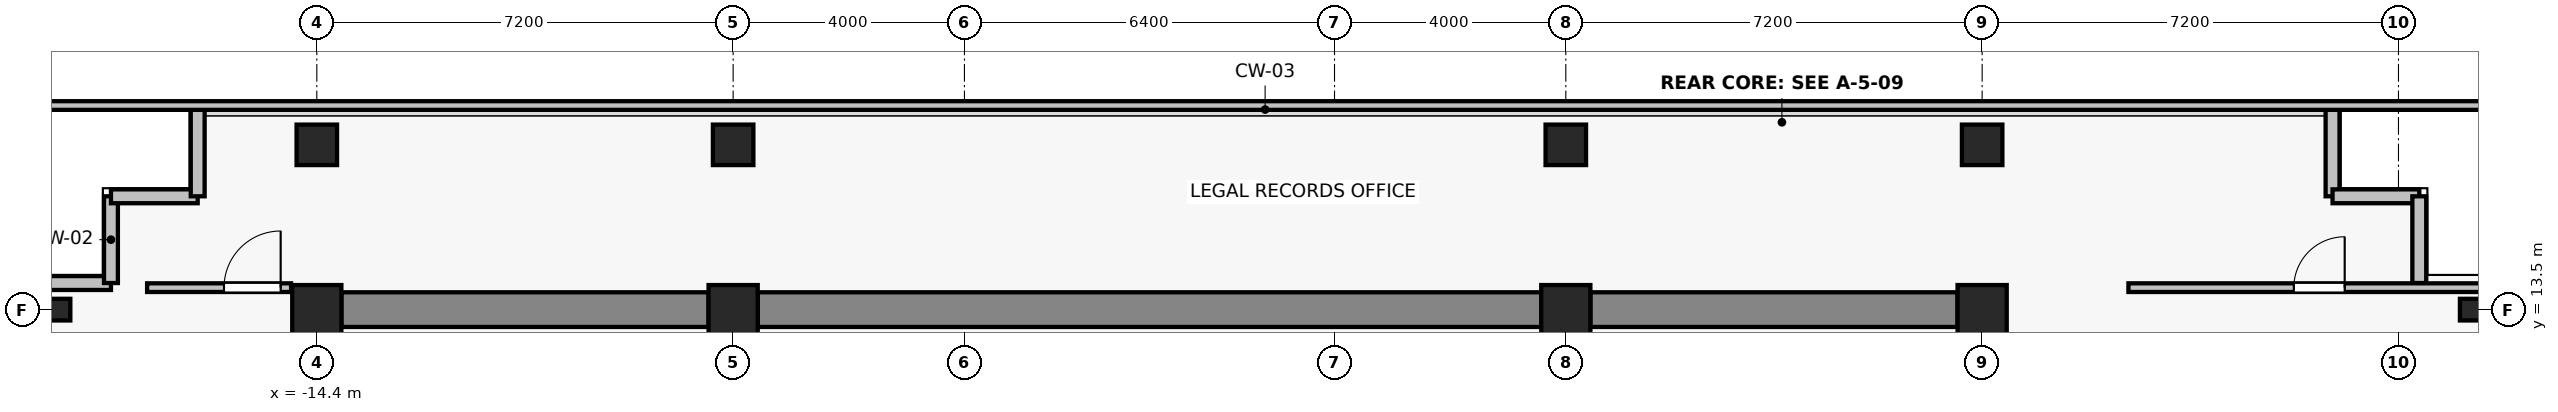
"""IFC4 building model, lengths in metres.
Left out: names, types, materials, properties, quantities, classifications, styles, units other than length and angle.
Written with IfcOpenShell. Run it as: python <this file> out.ifc"""

import sys

from ifc_helpers import new_model, si_unit, direction, frame, frame_2d, origin, origin_2d, place, context, subcontext, project, spatial, rectangle, i_section, extrude, source, transform, mapped, element, fill, save


model = new_model("IFC4")
c1 = context("Model", 3, precision=1e-05, world=origin(), true_north=direction((0.0, 1.0)))
c2 = subcontext(c1, "Body", "Model", "MODEL_VIEW")
j1 = project(units=[si_unit("LENGTHUNIT", "METRE"), si_unit("PLANEANGLEUNIT", "RADIAN")], contexts=[c1])
p1 = place(None, origin())
s1 = spatial("IfcSite", under=j1, at=p1, CompositionType="ELEMENT")
p2 = place(p1, origin())
s2 = spatial("IfcBuilding", under=s1, at=p2, CompositionType="ELEMENT")
p3 = place(p2, frame((0.0, 0.0, 255.1)))
s3 = spatial("IfcBuildingStorey", under=s2, at=p3, CompositionType="ELEMENT", Elevation=255.1)
for number, where, z_axis, x_axis in (
    (1, (-14.4, 13.5, 0.0), (0.0, 0.0, 1.0), (1.0, 0.0, 0.0)),
    (2, (-7.2, 13.5, 0.0), (0.0, 0.0, 1.0), (1.0, 0.0, 0.0)),
    (3, (7.2, 13.5, 0.0), (0.0, 0.0, 1.0), (1.0, 0.0, 0.0)),
    (4, (14.4, 13.5, 0.0), (0.0, 0.0, 1.0), (1.0, 0.0, 0.0)),
):
    element("IfcColumn", number, at=place(p3, frame(where, z_axis=z_axis, x_axis=x_axis)), inside=s3, PredefinedType="COLUMN", context=c2, shape_type="SweptSolid", body=[
        extrude(rectangle(XDim=0.85, YDim=0.85, at=origin_2d()), origin(), (0.0, 0.0, 1.0), 3.3),
    ])
for number, where, z_axis, x_axis in (
    (5, (-14.4, 16.35, 0.0), (0.0, 0.0, 1.0), (1.0, 0.0, 0.0)),
    (6, (-7.2, 16.35, 0.0), (0.0, 0.0, 1.0), (1.0, 0.0, 0.0)),
    (7, (7.2, 16.35, 0.0), (0.0, 0.0, 1.0), (1.0, 0.0, 0.0)),
    (8, (14.4, 16.35, 0.0), (0.0, 0.0, 1.0), (1.0, 0.0, 0.0)),
):
    element("IfcColumn", number, at=place(p3, frame(where, z_axis=z_axis, x_axis=x_axis)), inside=s3, PredefinedType="COLUMN", context=c2, shape_type="SweptSolid", body=[
        extrude(rectangle(XDim=0.7, YDim=0.7, at=origin_2d()), origin(), (0.0, 0.0, 1.0), 3.3),
    ])
for number, where, z_axis, x_axis in (
    (9, (-18.85, 13.5, 0.0), (0.0, 0.0, 1.0), (1.0, 0.0, 0.0)),
    (10, (22.85, 13.5, 0.0), (0.0, 0.0, 1.0), (1.0, 0.0, 0.0)),
):
    element("IfcColumn", number, at=place(p3, frame(where, z_axis=z_axis, x_axis=x_axis)), inside=s3, PredefinedType="COLUMN", context=c2, shape_type="SweptSolid", body=[
        extrude(i_section(OverallWidth=0.375, OverallDepth=0.375, WebThickness=0.017, FlangeThickness=0.027, FilletRadius=0.015, at=origin_2d()), origin(), (0.0, 0.0, 1.0), 3.3),
    ])
p4 = place(p3, frame((-13.975, 13.5, 0.0), z_axis=(0.0, 0.0, 1.0), x_axis=(1.0, 0.0, 0.0)))
e11 = element("IfcWall", 11, at=p4, inside=s3, PredefinedType="SHEAR", context=c2, shape_type="SweptSolid", body=[
    extrude(rectangle(XDim=6.35, YDim=0.6, at=frame_2d((3.175, 0.0))), origin(), (0.0, 0.0, 1.0), 3.075),
])
p5 = place(p3, frame((-6.775, 13.5, 0.0), z_axis=(0.0, 0.0, 1.0), x_axis=(1.0, 0.0, 0.0)))
e12 = element("IfcWall", 12, at=p5, inside=s3, PredefinedType="SHEAR", context=c2, shape_type="SweptSolid", body=[
    extrude(rectangle(XDim=13.55, YDim=0.6, at=frame_2d((6.775, 0.0))), origin(), (0.0, 0.0, 1.0), 3.075),
])
p6 = place(p3, frame((7.625, 13.5, 0.0), z_axis=(0.0, 0.0, 1.0), x_axis=(1.0, 0.0, 0.0)))
e13 = element("IfcWall", 13, at=p6, inside=s3, PredefinedType="SHEAR", context=c2, shape_type="SweptSolid", body=[
    extrude(rectangle(XDim=6.35, YDim=0.6, at=frame_2d((3.175, 0.0))), origin(), (0.0, 0.0, 1.0), 3.075),
])
for number, where, z_axis, x_axis in (
    (14, (-17.96, 13.96, 0.0), (0.0, 0.0, 1.0), (-1.0, 0.0, 0.0)),
    (15, (-17.96, 15.46, 0.0), (0.0, 0.0, 1.0), (0.0, -1.0, 0.0)),
    (16, (-16.46, 15.46, 0.0), (0.0, 0.0, 1.0), (-1.0, 0.0, 0.0)),
    (17, (-16.46, 16.96, 0.0), (0.0, 0.0, 1.0), (0.0, -1.0, 0.0)),
    (18, (20.46, 15.46, 0.0), (0.0, 0.0, 1.0), (0.0, 1.0, 0.0)),
    (19, (21.96, 15.46, 0.0), (0.0, 0.0, 1.0), (-1.0, 0.0, 0.0)),
    (20, (21.96, 13.96, 0.0), (0.0, 0.0, 1.0), (0.0, 1.0, 0.0)),
):
    element("IfcWall", number, at=place(p3, frame(where, z_axis=z_axis, x_axis=x_axis)), inside=s3, PredefinedType="SOLIDWALL", context=c2, shape_type="SweptSolid", body=[
        extrude(rectangle(XDim=1.5, YDim=0.24, at=frame_2d((0.75, 0.0))), origin(), (0.0, 0.0, 1.0), 3.075),
    ])
p7 = place(p3, frame((-17.335, 13.88, 0.0), z_axis=(0.0, 0.0, 1.0), x_axis=(1.0, 0.0, 0.0)))
e21 = element("IfcWall", 21, at=p7, inside=s3, PredefinedType="PARTITIONING", context=c2, shape_type="SweptSolid", body=[
    extrude(rectangle(XDim=2.49, YDim=0.15, at=frame_2d((1.245, 0.0))), origin(), (0.0, 0.0, 1.0), 3.075),
])
p8 = place(p7, frame((1.33, 0.0, 0.0)))
e22 = element("IfcOpeningElement", 22, at=p8, cuts=e21, PredefinedType="OPENING", context=c2, shape_type="SweptSolid", body=[
    extrude(rectangle(XDim=0.98, YDim=2.15, at=frame_2d((0.49, 1.075))), frame((0.0, 0.085, 0.0), z_axis=(0.0, -1.0, 0.0), x_axis=(1.0, 0.0, 0.0)), (0.0, 0.0, 1.0), 0.17),
])
p9 = place(p3, frame((16.93, 13.88, 0.0), z_axis=(0.0, 0.0, 1.0), x_axis=(1.0, 0.0, 0.0)))
e23 = element("IfcWall", 23, at=p9, inside=s3, PredefinedType="PARTITIONING", context=c2, shape_type="SweptSolid", body=[
    extrude(rectangle(XDim=6.6, YDim=0.15, at=frame_2d((3.3, 0.0))), origin(), (0.0, 0.0, 1.0), 3.075),
])
p10 = place(p9, frame((2.86, 0.0, 0.0)))
e24 = element("IfcOpeningElement", 24, at=p10, cuts=e23, PredefinedType="OPENING", context=c2, shape_type="SweptSolid", body=[
    extrude(rectangle(XDim=0.88, YDim=2.1, at=frame_2d((0.44, 1.05))), frame((0.0, 0.085, 0.0), z_axis=(0.0, -1.0, 0.0), x_axis=(1.0, 0.0, 0.0)), (0.0, 0.0, 1.0), 0.17),
])
p11 = place(p3, frame((-19.53, 17.03, 0.0), z_axis=(0.0, 0.0, 1.0), x_axis=(1.0, 0.0, 0.0)))
e25 = element("IfcWall", 25, at=p11, inside=s3, PredefinedType="PARTITIONING", context=c2, shape_type="SweptSolid", body=[
    extrude(rectangle(XDim=43.06, YDim=0.15, at=frame_2d((21.53, 0.0))), origin(), (0.0, 0.0, 1.0), 3.075),
])
m1 = source(origin(), c2, "Body", "SweptSolid", [
    extrude(rectangle(XDim=0.98, YDim=2.15, at=frame_2d((0.49, 1.075))), frame((0.0, 0.025, 0.0), z_axis=(0.0, -1.0, 0.0), x_axis=(1.0, 0.0, 0.0)), (0.0, 0.0, 1.0), 0.05),
])
p12 = place(p8, origin())
e26 = element("IfcDoor", 26, at=p12, inside=s3, OperationType="SINGLE_SWING_RIGHT", PredefinedType="DOOR", context=c2, shape_type="MappedRepresentation", body=[
    mapped(m1, transform((0.0, 0.0, 0.0), x_axis=(1.0, 0.0, 0.0), y_axis=(0.0, 1.0, 0.0), z_axis=(0.0, 0.0, 1.0), scale=1.0)),
])
fill(e22, e26)
m2 = source(origin(), c2, "Body", "SweptSolid", [
    extrude(rectangle(XDim=0.88, YDim=2.1, at=frame_2d((0.44, 1.05))), frame((0.0, 0.025, 0.0), z_axis=(0.0, -1.0, 0.0), x_axis=(1.0, 0.0, 0.0)), (0.0, 0.0, 1.0), 0.05),
])
p13 = place(p10, origin())
e27 = element("IfcDoor", 27, at=p13, inside=s3, OperationType="SINGLE_SWING_RIGHT", PredefinedType="DOOR", context=c2, shape_type="MappedRepresentation", body=[
    mapped(m2, transform((0.0, 0.0, 0.0), x_axis=(1.0, 0.0, 0.0), y_axis=(0.0, 1.0, 0.0), z_axis=(0.0, 0.0, 1.0), scale=1.0)),
])
fill(e24, e27)
save(model, sys.argv[1])
